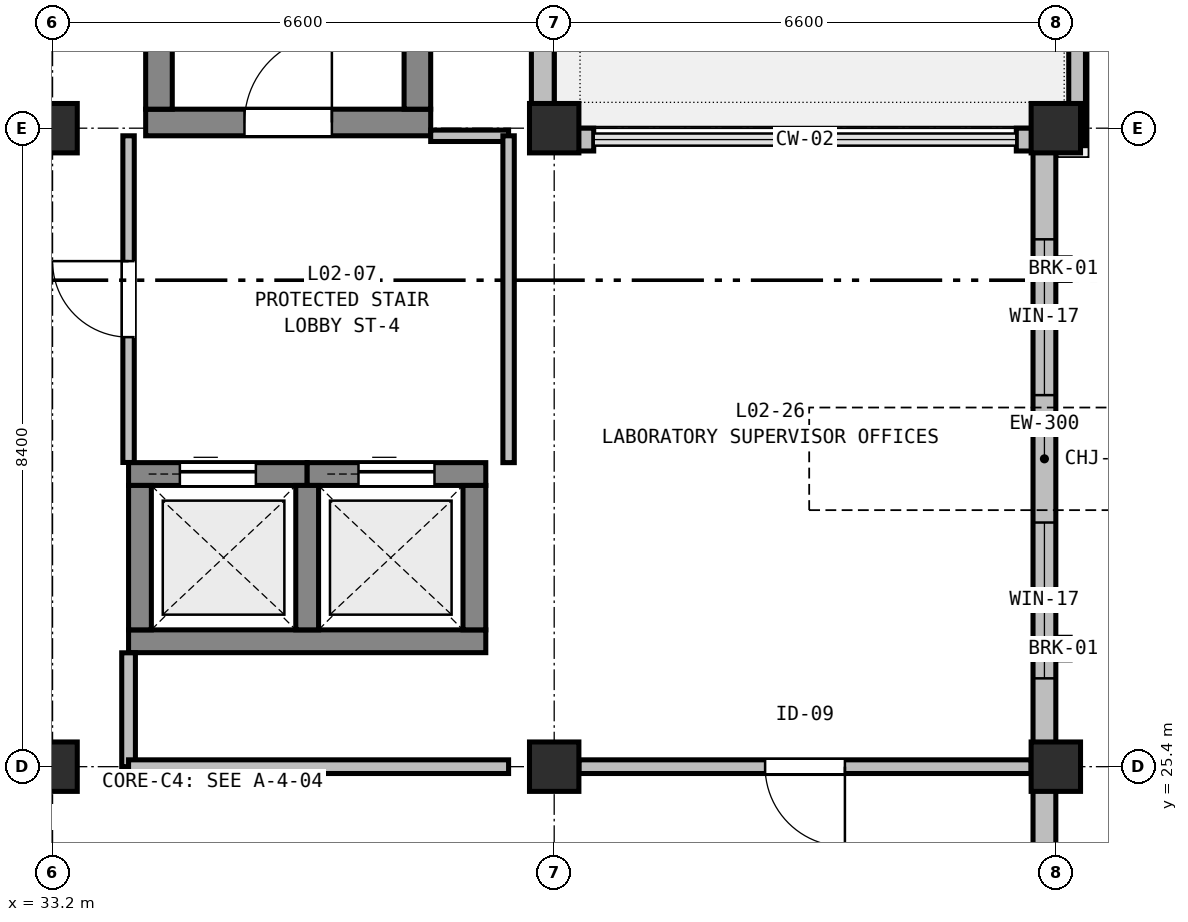
"""IFC4 building model, lengths in metres.
Left out: names, types, materials, properties, quantities, classifications, styles, units other than length and angle.
Written with IfcOpenShell. Run it as: python <this file> out.ifc"""

import sys

from ifc_helpers import new_model, si_unit, direction, frame, frame_2d, origin, origin_2d, place, context, subcontext, project, spatial, rectangle, extrude, element, fill, save


model = new_model("IFC4")
c1 = context("Model", 3, precision=1e-05, world=origin(), true_north=direction((0.0, 1.0)))
c2 = subcontext(c1, "Body", "Model", "MODEL_VIEW")
j1 = project(units=[si_unit("LENGTHUNIT", "METRE"), si_unit("PLANEANGLEUNIT", "RADIAN")], contexts=[c1])
p1 = place(None, origin())
s1 = spatial("IfcSite", under=j1, at=p1, CompositionType="ELEMENT")
p2 = place(p1, origin())
s2 = spatial("IfcBuilding", under=s1, at=p2, CompositionType="ELEMENT")
p3 = place(p2, frame((0.0, 0.0, 10.2)))
s3 = spatial("IfcBuildingStorey", under=s2, at=p3, CompositionType="ELEMENT", Elevation=10.2)
for number, where, z_axis, x_axis in (
    (1, (33.2, 25.4, 0.0), (0.0, 0.0, 1.0), (1.0, 0.0, 0.0)),
    (2, (33.2, 33.8, 0.0), (0.0, 0.0, 1.0), (1.0, 0.0, 0.0)),
    (3, (39.8, 25.4, 0.0), (0.0, 0.0, 1.0), (1.0, 0.0, 0.0)),
    (4, (39.8, 33.8, 0.0), (0.0, 0.0, 1.0), (1.0, 0.0, 0.0)),
):
    element("IfcColumn", number, at=place(p3, frame(where, z_axis=z_axis, x_axis=x_axis)), inside=s3, PredefinedType="COLUMN", context=c2, shape_type="SweptSolid", body=[
        extrude(rectangle(XDim=0.65, YDim=0.65, at=origin_2d()), origin(), (0.0, 0.0, 1.0), 4.8),
    ])
for number, where, z_axis, x_axis in (
    (5, (46.4, 25.4, 0.0), (0.0, 0.0, 1.0), (1.0, 0.0, 0.0)),
    (6, (46.4, 33.8, 0.0), (0.0, 0.0, 1.0), (1.0, 0.0, 0.0)),
):
    element("IfcColumn", number, at=place(p3, frame(where, z_axis=z_axis, x_axis=x_axis)), inside=s3, PredefinedType="COLUMN", context=c2, shape_type="SweptSolid", body=[
        extrude(rectangle(XDim=0.65, YDim=0.65, at=origin_2d()), origin(), (0.0, 0.0, 1.0), 4.74),
    ])
p4 = place(p3, frame((34.425, 33.875, 0.0), z_axis=(0.0, 0.0, 1.0), x_axis=(1.0, 0.0, 0.0)))
e7 = element("IfcWall", 7, at=p4, inside=s3, PredefinedType="SHEAR", context=c2, shape_type="SweptSolid", body=[
    extrude(rectangle(XDim=3.75, YDim=0.35, at=frame_2d((1.875, 0.0))), origin(), (0.0, 0.0, 1.0), 4.8),
])
p5 = place(p4, frame((1.3, 0.0, 0.0)))
e8 = element("IfcOpeningElement", 8, at=p5, cuts=e7, PredefinedType="OPENING", context=c2, shape_type="SweptSolid", body=[
    extrude(rectangle(XDim=1.15, YDim=2.15, at=frame_2d((0.575, 1.075))), frame((0.0, 0.185, 0.0), z_axis=(0.0, -1.0, 0.0), x_axis=(1.0, 0.0, 0.0)), (0.0, 0.0, 1.0), 0.37),
])
for number, where, z_axis, x_axis in (
    (9, (34.6, 34.05, 0.0), (0.0, 0.0, 1.0), (0.0, 1.0, 0.0)),
    (10, (38.0, 34.05, 0.0), (0.0, 0.0, 1.0), (0.0, 1.0, 0.0)),
):
    element("IfcWall", number, at=place(p3, frame(where, z_axis=z_axis, x_axis=x_axis)), inside=s3, PredefinedType="SHEAR", context=c2, shape_type="SweptSolid", body=[
        extrude(rectangle(XDim=7.275, YDim=0.35, at=frame_2d((3.637, 0.0))), origin(), (0.0, 0.0, 1.0), 4.8),
    ])
p6 = place(p3, frame((34.2, 27.05, 0.0), z_axis=(0.0, 0.0, 1.0), x_axis=(1.0, 0.0, 0.0)))
e11 = element("IfcWall", 11, at=p6, inside=s3, PredefinedType="SHEAR", context=c2, shape_type="SweptSolid", body=[
    extrude(rectangle(XDim=4.7, YDim=0.3, at=frame_2d((2.35, 0.0))), origin(), (0.0, 0.0, 1.0), 4.8),
])
p7 = place(p3, frame((34.2, 29.25, 0.0), z_axis=(0.0, 0.0, 1.0), x_axis=(1.0, 0.0, 0.0)))
e12 = element("IfcWall", 12, at=p7, inside=s3, PredefinedType="SHEAR", context=c2, shape_type="SweptSolid", body=[
    extrude(rectangle(XDim=2.35, YDim=0.3, at=frame_2d((1.175, 0.0))), origin(), (0.0, 0.0, 1.0), 4.8),
])
p8 = place(p7, frame((0.675, 0.0, 0.0)))
e13 = element("IfcOpeningElement", 13, at=p8, cuts=e12, PredefinedType="OPENING", context=c2, shape_type="SweptSolid", body=[
    extrude(rectangle(XDim=1.0, YDim=2.1, at=frame_2d((0.5, 1.05))), frame((0.0, 0.16, 0.0), z_axis=(0.0, -1.0, 0.0), x_axis=(1.0, 0.0, 0.0)), (0.0, 0.0, 1.0), 0.32),
])
p9 = place(p3, frame((36.55, 29.25, 0.0), z_axis=(0.0, 0.0, 1.0), x_axis=(1.0, 0.0, 0.0)))
e14 = element("IfcWall", 14, at=p9, inside=s3, PredefinedType="SHEAR", context=c2, shape_type="SweptSolid", body=[
    extrude(rectangle(XDim=2.35, YDim=0.3, at=frame_2d((1.175, 0.0))), origin(), (0.0, 0.0, 1.0), 4.8),
])
p10 = place(p9, frame((0.675, 0.0, 0.0)))
e15 = element("IfcOpeningElement", 15, at=p10, cuts=e14, PredefinedType="OPENING", context=c2, shape_type="SweptSolid", body=[
    extrude(rectangle(XDim=1.0, YDim=2.1, at=frame_2d((0.5, 1.05))), frame((0.0, 0.16, 0.0), z_axis=(0.0, -1.0, 0.0), x_axis=(1.0, 0.0, 0.0)), (0.0, 0.0, 1.0), 0.32),
])
for number, where, z_axis, x_axis in (
    (16, (34.35, 27.2, 0.0), (0.0, 0.0, 1.0), (0.0, 1.0, 0.0)),
    (17, (36.55, 27.2, 0.0), (0.0, 0.0, 1.0), (0.0, 1.0, 0.0)),
    (18, (38.75, 27.2, 0.0), (0.0, 0.0, 1.0), (0.0, 1.0, 0.0)),
):
    element("IfcWall", number, at=place(p3, frame(where, z_axis=z_axis, x_axis=x_axis)), inside=s3, PredefinedType="SHEAR", context=c2, shape_type="SweptSolid", body=[
        extrude(rectangle(XDim=1.9, YDim=0.3, at=frame_2d((0.95, 0.0))), origin(), (0.0, 0.0, 1.0), 4.8),
    ])
p11 = place(p3, frame((39.65, 41.9, 0.0), z_axis=(0.0, 0.0, 1.0), x_axis=(0.0, -1.0, 0.0)))
e19 = element("IfcWall", 19, at=p11, inside=s3, PredefinedType="STANDARD", context=c2, shape_type="SweptSolid", body=[
    extrude(rectangle(XDim=7.8, YDim=0.3, at=frame_2d((3.9, 0.0))), origin(), (0.0, 0.0, 1.0), 3.935),
])
p12 = place(p11, frame((1.181, 0.0, 0.9)))
e20 = element("IfcOpeningElement", 20, at=p12, cuts=e19, PredefinedType="OPENING", context=c2, shape_type="SweptSolid", body=[
    extrude(rectangle(XDim=1.85, YDim=1.6, at=frame_2d((0.925, 0.8))), frame((0.0, 0.16, 0.0), z_axis=(0.0, -1.0, 0.0), x_axis=(1.0, 0.0, 0.0)), (0.0, 0.0, 1.0), 0.32),
])
p13 = place(p11, frame((4.769, 0.0, 0.9)))
e21 = element("IfcOpeningElement", 21, at=p13, cuts=e19, PredefinedType="OPENING", context=c2, shape_type="SweptSolid", body=[
    extrude(rectangle(XDim=1.85, YDim=1.6, at=frame_2d((0.925, 0.8))), frame((0.0, 0.16, 0.0), z_axis=(0.0, -1.0, 0.0), x_axis=(1.0, 0.0, 0.0)), (0.0, 0.0, 1.0), 0.32),
])
for number, where, z_axis, x_axis in (
    (22, (39.8, 33.65, 0.0), (0.0, 0.0, 1.0), (1.0, 0.0, 0.0)),
    (23, (45.88, 33.65, 0.0), (0.0, 0.0, 1.0), (1.0, 0.0, 0.0)),
):
    element("IfcWall", number, at=place(p3, frame(where, z_axis=z_axis, x_axis=x_axis)), inside=s3, PredefinedType="STANDARD", context=c2, shape_type="SweptSolid", body=[
        extrude(rectangle(XDim=0.52, YDim=0.3, at=frame_2d((0.26, 0.0))), origin(), (0.0, 0.0, 1.0), 3.935),
    ])
p14 = place(p3, frame((46.25, 33.5, 0.0), z_axis=(0.0, 0.0, 1.0), x_axis=(0.0, -1.0, 0.0)))
e24 = element("IfcWall", 24, at=p14, inside=s3, PredefinedType="STANDARD", context=c2, shape_type="SweptSolid", body=[
    extrude(rectangle(XDim=8.1, YDim=0.3, at=frame_2d((4.05, 0.0))), origin(), (0.0, 0.0, 1.0), 4.085),
])
p15 = place(p14, frame((1.162, 0.0, 0.9)))
e25 = element("IfcOpeningElement", 25, at=p15, cuts=e24, PredefinedType="OPENING", context=c2, shape_type="SweptSolid", body=[
    extrude(rectangle(XDim=2.05, YDim=1.65, at=frame_2d((1.025, 0.825))), frame((0.0, 0.16, 0.0), z_axis=(0.0, -1.0, 0.0), x_axis=(1.0, 0.0, 0.0)), (0.0, 0.0, 1.0), 0.32),
])
p16 = place(p14, frame((4.888, 0.0, 0.9)))
e26 = element("IfcOpeningElement", 26, at=p16, cuts=e24, PredefinedType="OPENING", context=c2, shape_type="SweptSolid", body=[
    extrude(rectangle(XDim=2.05, YDim=1.65, at=frame_2d((1.025, 0.825))), frame((0.0, 0.16, 0.0), z_axis=(0.0, -1.0, 0.0), x_axis=(1.0, 0.0, 0.0)), (0.0, 0.0, 1.0), 0.32),
])
p17 = place(p3, frame((46.25, 25.4, 0.0), z_axis=(0.0, 0.0, 1.0), x_axis=(0.0, -1.0, 0.0)))
e27 = element("IfcWall", 27, at=p17, inside=s3, PredefinedType="STANDARD", context=c2, shape_type="SweptSolid", body=[
    extrude(rectangle(XDim=8.4, YDim=0.3, at=frame_2d((4.2, 0.0))), origin(), (0.0, 0.0, 1.0), 4.085),
])
p18 = place(p17, frame((2.64, 0.0, 0.9)))
e28 = element("IfcOpeningElement", 28, at=p18, cuts=e27, PredefinedType="OPENING", context=c2, shape_type="SweptSolid", body=[
    extrude(rectangle(XDim=2.35, YDim=1.5, at=frame_2d((1.175, 0.75))), frame((0.0, 0.16, 0.0), z_axis=(0.0, -1.0, 0.0), x_axis=(1.0, 0.0, 0.0)), (0.0, 0.0, 1.0), 0.32),
])
p19 = place(p3, frame((46.68, 42.48, 0.0), z_axis=(0.0, 0.0, 1.0), x_axis=(0.0, -1.0, 0.0)))
e29 = element("IfcWall", 29, at=p19, inside=s3, PredefinedType="PARAPET", context=c2, shape_type="SweptSolid", body=[
    extrude(rectangle(XDim=8.91, YDim=0.22, at=frame_2d((4.455, 0.0))), origin(), (0.0, 0.0, 1.0), 0.68),
])
p20 = place(p3, frame((38.175, 33.7, 0.0), z_axis=(0.0, 0.0, 1.0), x_axis=(1.0, 0.0, 0.0)))
e30 = element("IfcWall", 30, at=p20, inside=s3, PredefinedType="PARTITIONING", context=c2, shape_type="SweptSolid", body=[
    extrude(rectangle(XDim=1.025, YDim=0.15, at=frame_2d((0.512, 0.0))), origin(), (0.0, 0.0, 1.0), 4.135),
])
p21 = place(p3, frame((39.2, 33.7, 0.0), z_axis=(0.0, 0.0, 1.0), x_axis=(0.0, -1.0, 0.0)))
e31 = element("IfcWall", 31, at=p21, inside=s3, PredefinedType="PARTITIONING", context=c2, shape_type="SweptSolid", body=[
    extrude(rectangle(XDim=4.3, YDim=0.15, at=frame_2d((2.15, 0.0))), origin(), (0.0, 0.0, 1.0), 4.135),
])
p22 = place(p3, frame((34.2, 29.402, 0.0), z_axis=(0.0, 0.0, 1.0), x_axis=(0.0, 1.0, 0.0)))
e32 = element("IfcWall", 32, at=p22, inside=s3, PredefinedType="PARTITIONING", context=c2, shape_type="SweptSolid", body=[
    extrude(rectangle(XDim=4.298, YDim=0.15, at=frame_2d((2.149, 0.0))), origin(), (0.0, 0.0, 1.0), 4.135),
])
p23 = place(p22, frame((1.649, 0.0, 0.0)))
e33 = element("IfcOpeningElement", 33, at=p23, cuts=e32, PredefinedType="OPENING", context=c2, shape_type="SweptSolid", body=[
    extrude(rectangle(XDim=1.0, YDim=2.1, at=frame_2d((0.5, 1.05))), frame((0.0, 0.085, 0.0), z_axis=(0.0, -1.0, 0.0), x_axis=(1.0, 0.0, 0.0)), (0.0, 0.0, 1.0), 0.17),
])
p24 = place(p3, frame((34.2, 25.4, 0.0), z_axis=(0.0, 0.0, 1.0), x_axis=(0.0, 1.0, 0.0)))
e34 = element("IfcWall", 34, at=p24, inside=s3, PredefinedType="PARTITIONING", context=c2, shape_type="SweptSolid", body=[
    extrude(rectangle(XDim=1.498, YDim=0.18, at=frame_2d((0.749, 0.0))), origin(), (0.0, 0.0, 1.0), 4.135),
])
p25 = place(p3, frame((46.075, 25.4, 0.0), z_axis=(0.0, 0.0, 1.0), x_axis=(-1.0, 0.0, 0.0)))
e35 = element("IfcWall", 35, at=p25, inside=s3, PredefinedType="PARTITIONING", context=c2, shape_type="SweptSolid", body=[
    extrude(rectangle(XDim=5.95, YDim=0.18, at=frame_2d((2.975, 0.0))), origin(), (0.0, 0.0, 1.0), 4.135),
])
p26 = place(p25, frame((2.45, 0.0, 0.0)))
e36 = element("IfcOpeningElement", 36, at=p26, cuts=e35, PredefinedType="OPENING", context=c2, shape_type="SweptSolid", body=[
    extrude(rectangle(XDim=1.05, YDim=2.06, at=frame_2d((0.525, 1.03))), frame((0.0, 0.1, 0.0), z_axis=(0.0, -1.0, 0.0), x_axis=(1.0, 0.0, 0.0)), (0.0, 0.0, 1.0), 0.2),
])
p27 = place(p3, frame((39.2, 25.4, 0.0), z_axis=(0.0, 0.0, 1.0), x_axis=(-1.0, 0.0, 0.0)))
e37 = element("IfcWall", 37, at=p27, inside=s3, PredefinedType="PARTITIONING", context=c2, shape_type="SweptSolid", body=[
    extrude(rectangle(XDim=5.0, YDim=0.18, at=frame_2d((2.5, 0.0))), origin(), (0.0, 0.0, 1.0), 4.135),
])
p28 = place(p15, origin())
e38 = element("IfcWindow", 38, at=p28, inside=s3, PartitioningType="SINGLE_PANEL", PredefinedType="WINDOW", context=c2, shape_type="SweptSolid", body=[
    extrude(rectangle(XDim=2.05, YDim=1.65, at=frame_2d((1.025, 0.825))), frame((0.0, 0.03, 0.0), z_axis=(0.0, -1.0, 0.0), x_axis=(1.0, 0.0, 0.0)), (0.0, 0.0, 1.0), 0.06),
])
fill(e25, e38)
p29 = place(p16, origin())
e39 = element("IfcWindow", 39, at=p29, inside=s3, PartitioningType="SINGLE_PANEL", PredefinedType="WINDOW", context=c2, shape_type="SweptSolid", body=[
    extrude(rectangle(XDim=2.05, YDim=1.65, at=frame_2d((1.025, 0.825))), frame((0.0, 0.03, 0.0), z_axis=(0.0, -1.0, 0.0), x_axis=(1.0, 0.0, 0.0)), (0.0, 0.0, 1.0), 0.06),
])
fill(e26, e39)
p30 = place(p5, origin())
e40 = element("IfcDoor", 40, at=p30, inside=s3, OperationType="SINGLE_SWING_RIGHT", PredefinedType="DOOR", context=c2, shape_type="SweptSolid", body=[
    extrude(rectangle(XDim=1.15, YDim=2.15, at=frame_2d((0.575, 1.075))), frame((0.0, 0.025, 0.0), z_axis=(0.0, -1.0, 0.0), x_axis=(1.0, 0.0, 0.0)), (0.0, 0.0, 1.0), 0.05),
])
fill(e8, e40)
p31 = place(p8, origin())
e41 = element("IfcDoor", 41, at=p31, inside=s3, OperationType="SLIDING_TO_LEFT", PredefinedType="DOOR", context=c2, shape_type="SweptSolid", body=[
    extrude(rectangle(XDim=1.0, YDim=2.1, at=frame_2d((0.5, 1.05))), frame((0.0, 0.025, 0.0), z_axis=(0.0, -1.0, 0.0), x_axis=(1.0, 0.0, 0.0)), (0.0, 0.0, 1.0), 0.05),
])
fill(e13, e41)
p32 = place(p10, origin())
e42 = element("IfcDoor", 42, at=p32, inside=s3, OperationType="SLIDING_TO_LEFT", PredefinedType="DOOR", context=c2, shape_type="SweptSolid", body=[
    extrude(rectangle(XDim=1.0, YDim=2.1, at=frame_2d((0.5, 1.05))), frame((0.0, 0.025, 0.0), z_axis=(0.0, -1.0, 0.0), x_axis=(1.0, 0.0, 0.0)), (0.0, 0.0, 1.0), 0.05),
])
fill(e15, e42)
p33 = place(p23, origin())
e43 = element("IfcDoor", 43, at=p33, inside=s3, OperationType="SINGLE_SWING_RIGHT", PredefinedType="DOOR", context=c2, shape_type="SweptSolid", body=[
    extrude(rectangle(XDim=1.0, YDim=2.1, at=frame_2d((0.5, 1.05))), frame((0.0, 0.025, 0.0), z_axis=(0.0, -1.0, 0.0), x_axis=(1.0, 0.0, 0.0)), (0.0, 0.0, 1.0), 0.05),
])
fill(e33, e43)
p34 = place(p26, origin())
e44 = element("IfcDoor", 44, at=p34, inside=s3, OperationType="SINGLE_SWING_LEFT", PredefinedType="DOOR", context=c2, shape_type="SweptSolid", body=[
    extrude(rectangle(XDim=1.05, YDim=2.06, at=frame_2d((0.525, 1.03))), frame((0.0, 0.025, 0.0), z_axis=(0.0, -1.0, 0.0), x_axis=(1.0, 0.0, 0.0)), (0.0, 0.0, 1.0), 0.05),
])
fill(e36, e44)
save(model, sys.argv[1])
